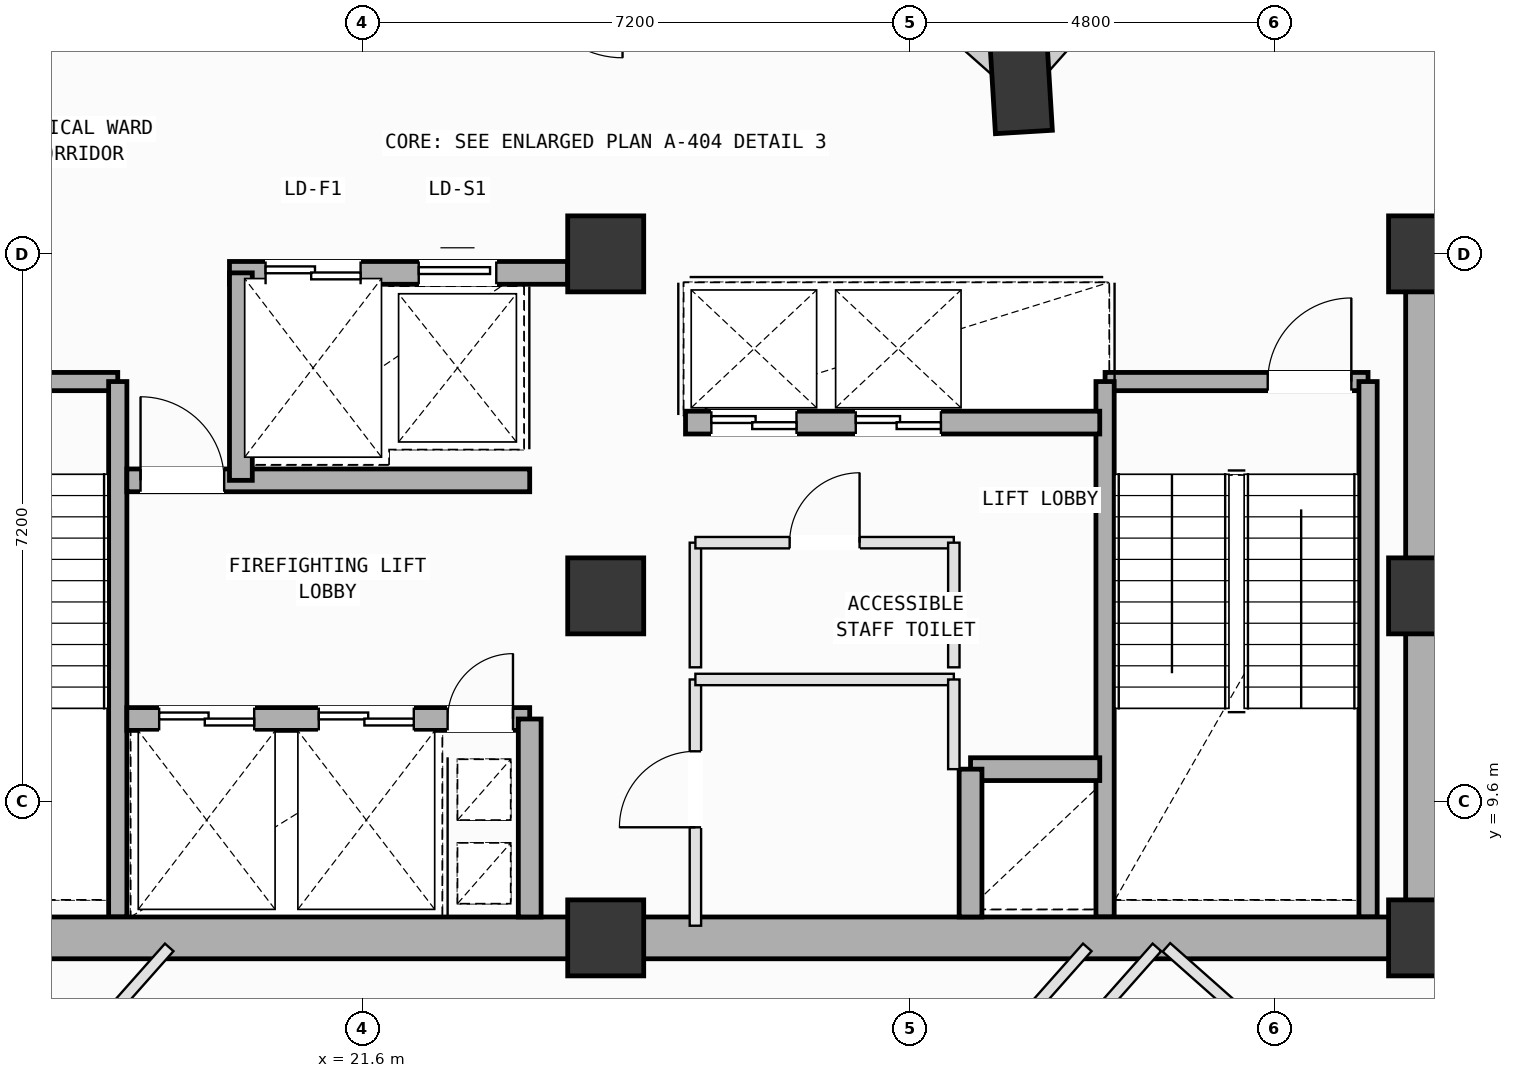
"""IFC4 building model, lengths in metres.
Left out: names, types, materials, properties, quantities, classifications, styles, units other than length and angle.
Written with IfcOpenShell. Run it as: python <this file> out.ifc"""

import sys

from ifc_helpers import new_model, si_unit, direction, frame, frame_2d, origin, origin_2d, place, context, subcontext, project, spatial, rectangle, extrude, element, fill, save


model = new_model("IFC4")
c1 = context("Model", 3, precision=1e-05, world=origin(), true_north=direction((0.0, 1.0)))
c2 = subcontext(c1, "Body", "Model", "MODEL_VIEW")
j1 = project(units=[si_unit("LENGTHUNIT", "METRE"), si_unit("PLANEANGLEUNIT", "RADIAN")], contexts=[c1])
p1 = place(None, origin())
s1 = spatial("IfcSite", under=j1, at=p1, CompositionType="ELEMENT")
p2 = place(p1, origin())
s2 = spatial("IfcBuilding", under=s1, at=p2, CompositionType="ELEMENT")
p3 = place(p2, frame((0.0, 0.0, 231.2)))
s3 = spatial("IfcBuildingStorey", under=s2, at=p3, CompositionType="ELEMENT", Elevation=231.2)
for number, where, z_axis, x_axis in (
    (1, (24.8, 7.8, 0.0), (0.0, 0.0, 1.0), (1.0, 0.0, 0.0)),
    (2, (24.8, 12.3, 0.0), (0.0, 0.0, 1.0), (1.0, 0.0, 0.0)),
    (3, (24.8, 16.8, 0.0), (0.0, 0.0, 1.0), (1.0, 0.0, 0.0)),
    (4, (35.6, 7.8, 0.0), (0.0, 0.0, 1.0), (1.0, 0.0, 0.0)),
    (5, (35.6, 12.3, 0.0), (0.0, 0.0, 1.0), (1.0, 0.0, 0.0)),
    (6, (35.6, 16.8, 0.0), (0.0, 0.0, 1.0), (1.0, 0.0, 0.0)),
):
    element("IfcColumn", number, at=place(p3, frame(where, z_axis=z_axis, x_axis=x_axis)), inside=s3, PredefinedType="COLUMN", context=c2, shape_type="SweptSolid", body=[
        extrude(rectangle(XDim=1.0, YDim=1.0, at=origin_2d()), origin(), (0.0, 0.0, 1.0), 4.0),
    ])
p4 = place(p3, frame((30.266, 19.003, 0.002), z_axis=(0.024121719548, -0.013618084707, 0.999616271584), x_axis=(-0.898481897541, 0.438138960704, 0.02765015198)))
e7 = element("IfcColumn", 7, at=p4, inside=s3, PredefinedType="COLUMN", context=c2, shape_type="SweptSolid", body=[
    extrude(rectangle(XDim=1.2, YDim=0.75, at=origin_2d()), origin(), (0.0, 0.0, 1.0), 3.998),
])
p5 = place(p3, frame((30.535, 19.306, 0.0), z_axis=(0.0, 0.0, 1.0), x_axis=(0.663265631708, 0.748384060356, 0.0)))
e8 = element("IfcWall", 8, at=p5, inside=s3, PredefinedType="SOLIDWALL", context=c2, shape_type="SweptSolid", body=[
    extrude(rectangle(XDim=6.158, YDim=0.28, at=frame_2d((3.079, 0.0))), origin(), (0.0, 0.0, 1.0), 3.265),
])
p6 = place(p5, frame((0.858, 0.0, 0.75)))
e9 = element("IfcOpeningElement", 9, at=p6, cuts=e8, PredefinedType="OPENING", context=c2, shape_type="SweptSolid", body=[
    extrude(rectangle(XDim=1.2, YDim=1.75, at=frame_2d((0.6, 0.875))), frame((0.0, 0.15, 0.0), z_axis=(0.0, -1.0, 0.0), x_axis=(1.0, 0.0, 0.0)), (0.0, 0.0, 1.0), 0.3),
])
p7 = place(p5, frame((4.406, 0.0, 0.75)))
e10 = element("IfcOpeningElement", 10, at=p7, cuts=e8, PredefinedType="OPENING", context=c2, shape_type="SweptSolid", body=[
    extrude(rectangle(XDim=1.2, YDim=1.75, at=frame_2d((0.6, 0.875))), frame((0.0, 0.15, 0.0), z_axis=(0.0, -1.0, 0.0), x_axis=(1.0, 0.0, 0.0)), (0.0, 0.0, 1.0), 0.3),
])
p8 = place(p3, frame((24.802, 23.845, 0.0), z_axis=(0.0, 0.0, 1.0), x_axis=(0.748368709558, -0.663282952106, 0.0)))
e11 = element("IfcWall", 11, at=p8, inside=s3, PredefinedType="SOLIDWALL", context=c2, shape_type="SweptSolid", body=[
    extrude(rectangle(XDim=6.958, YDim=0.28, at=frame_2d((3.479, 0.0))), origin(), (0.0, 0.0, 1.0), 3.165),
])
p9 = place(p3, frame((14.92, 15.12, 0.0), z_axis=(0.0, 0.0, 1.0), x_axis=(1.0, 0.0, 0.0)))
e12 = element("IfcWall", 12, at=p9, inside=s3, PredefinedType="SOLIDWALL", context=c2, shape_type="SweptSolid", body=[
    extrude(rectangle(XDim=3.46, YDim=0.24, at=frame_2d((1.73, 0.0))), origin(), (0.0, 0.0, 1.0), 3.78),
])
p10 = place(p9, frame((0.22, 0.0, 0.0)))
e13 = element("IfcOpeningElement", 13, at=p10, cuts=e12, PredefinedType="OPENING", context=c2, shape_type="SweptSolid", body=[
    extrude(rectangle(XDim=1.1, YDim=2.15, at=frame_2d((0.55, 1.075))), frame((0.0, 0.13, 0.0), z_axis=(0.0, -1.0, 0.0), x_axis=(1.0, 0.0, 0.0)), (0.0, 0.0, 1.0), 0.26),
])
p11 = place(p3, frame((18.38, 15.12, 0.0), z_axis=(0.0, 0.0, 1.0), x_axis=(0.0, -1.0, 0.0)))
e14 = element("IfcWall", 14, at=p11, inside=s3, PredefinedType="SOLIDWALL", context=c2, shape_type="SweptSolid", body=[
    extrude(rectangle(XDim=7.045, YDim=0.24, at=frame_2d((3.522, 0.0))), origin(), (0.0, 0.0, 1.0), 3.78),
])
p12 = place(p3, frame((31.37, 15.12, 0.0), z_axis=(0.0, 0.0, 1.0), x_axis=(1.0, 0.0, 0.0)))
e15 = element("IfcWall", 15, at=p12, inside=s3, PredefinedType="SOLIDWALL", context=c2, shape_type="SweptSolid", body=[
    extrude(rectangle(XDim=3.46, YDim=0.24, at=frame_2d((1.73, 0.0))), origin(), (0.0, 0.0, 1.0), 3.78),
])
p13 = place(p12, frame((2.14, 0.0, 0.0)))
e16 = element("IfcOpeningElement", 16, at=p13, cuts=e15, PredefinedType="OPENING", context=c2, shape_type="SweptSolid", body=[
    extrude(rectangle(XDim=1.1, YDim=2.15, at=frame_2d((0.55, 1.075))), frame((0.0, 0.13, 0.0), z_axis=(0.0, -1.0, 0.0), x_axis=(1.0, 0.0, 0.0)), (0.0, 0.0, 1.0), 0.26),
])
for number, where, z_axis, x_axis in (
    (17, (34.83, 15.12, 0.0), (0.0, 0.0, 1.0), (0.0, -1.0, 0.0)),
    (18, (31.37, 8.075, 0.0), (0.0, 0.0, 1.0), (0.0, 1.0, 0.0)),
):
    element("IfcWall", number, at=place(p3, frame(where, z_axis=z_axis, x_axis=x_axis)), inside=s3, PredefinedType="SOLIDWALL", context=c2, shape_type="SweptSolid", body=[
        extrude(rectangle(XDim=7.045, YDim=0.24, at=frame_2d((3.522, 0.0))), origin(), (0.0, 0.0, 1.0), 3.78),
    ])
for number, where, z_axis, x_axis in (
    (19, (14.0, 7.8, 0.0), (0.0, 0.0, 1.0), (1.0, 0.0, 0.0)),
    (20, (24.8, 7.8, 0.0), (0.0, 0.0, 1.0), (1.0, 0.0, 0.0)),
):
    element("IfcWall", number, at=place(p3, frame(where, z_axis=z_axis, x_axis=x_axis)), inside=s3, PredefinedType="SHEAR", context=c2, shape_type="SweptSolid", body=[
        extrude(rectangle(XDim=10.8, YDim=0.55, at=frame_2d((5.4, 0.0))), origin(), (0.0, 0.0, 1.0), 3.78),
    ])
p14 = place(p3, frame((35.6, 7.8, 0.0), z_axis=(0.0, 0.0, 1.0), x_axis=(0.0, 1.0, 0.0)))
e21 = element("IfcWall", 21, at=p14, inside=s3, PredefinedType="SHEAR", context=c2, shape_type="SweptSolid", body=[
    extrude(rectangle(XDim=9.0, YDim=0.55, at=frame_2d((4.5, 0.0))), origin(), (0.0, 0.0, 1.0), 3.78),
])
p15 = place(p3, frame((19.85, 16.55, 0.0), z_axis=(0.0, 0.0, 1.0), x_axis=(1.0, 0.0, 0.0)))
e22 = element("IfcWall", 22, at=p15, inside=s3, PredefinedType="SOLIDWALL", context=c2, shape_type="SweptSolid", body=[
    extrude(rectangle(XDim=4.45, YDim=0.3, at=frame_2d((2.225, 0.0))), origin(), (0.0, 0.0, 1.0), 3.78),
])
p16 = place(p15, frame((0.475, 0.0, 0.0)))
e23 = element("IfcOpeningElement", 23, at=p16, cuts=e22, PredefinedType="OPENING", context=c2, shape_type="SweptSolid", body=[
    extrude(rectangle(XDim=1.25, YDim=2.18, at=frame_2d((0.625, 1.09))), frame((0.0, 0.16, 0.0), z_axis=(0.0, -1.0, 0.0), x_axis=(1.0, 0.0, 0.0)), (0.0, 0.0, 1.0), 0.32),
])
p17 = place(p15, frame((2.49, 0.0, 0.0)))
e24 = element("IfcOpeningElement", 24, at=p17, cuts=e22, PredefinedType="OPENING", context=c2, shape_type="SweptSolid", body=[
    extrude(rectangle(XDim=1.02, YDim=2.12, at=frame_2d((0.51, 1.06))), frame((0.0, 0.16, 0.0), z_axis=(0.0, -1.0, 0.0), x_axis=(1.0, 0.0, 0.0)), (0.0, 0.0, 1.0), 0.32),
])
p18 = place(p3, frame((18.5, 10.68, 0.0), z_axis=(0.0, 0.0, 1.0), x_axis=(1.0, 0.0, 0.0)))
e25 = element("IfcWall", 25, at=p18, inside=s3, PredefinedType="SOLIDWALL", context=c2, shape_type="SweptSolid", body=[
    extrude(rectangle(XDim=5.3, YDim=0.3, at=frame_2d((2.65, 0.0))), origin(), (0.0, 0.0, 1.0), 3.78),
])
p19 = place(p18, frame((4.22, 0.0, 0.0)))
e26 = element("IfcOpeningElement", 26, at=p19, cuts=e25, PredefinedType="OPENING", context=c2, shape_type="SweptSolid", body=[
    extrude(rectangle(XDim=0.86, YDim=2.06, at=frame_2d((0.43, 1.03))), frame((0.0, 0.16, 0.0), z_axis=(0.0, -1.0, 0.0), x_axis=(1.0, 0.0, 0.0)), (0.0, 0.0, 1.0), 0.32),
])
p20 = place(p18, frame((0.425, 0.0, 0.0)))
e27 = element("IfcOpeningElement", 27, at=p20, cuts=e25, PredefinedType="OPENING", context=c2, shape_type="SweptSolid", body=[
    extrude(rectangle(XDim=1.25, YDim=2.18, at=frame_2d((0.625, 1.09))), frame((0.0, 0.16, 0.0), z_axis=(0.0, -1.0, 0.0), x_axis=(1.0, 0.0, 0.0)), (0.0, 0.0, 1.0), 0.32),
])
p21 = place(p18, frame((2.525, 0.0, 0.0)))
e28 = element("IfcOpeningElement", 28, at=p21, cuts=e25, PredefinedType="OPENING", context=c2, shape_type="SweptSolid", body=[
    extrude(rectangle(XDim=1.25, YDim=2.18, at=frame_2d((0.625, 1.09))), frame((0.0, 0.16, 0.0), z_axis=(0.0, -1.0, 0.0), x_axis=(1.0, 0.0, 0.0)), (0.0, 0.0, 1.0), 0.32),
])
p22 = place(p3, frame((18.5, 13.82, 0.0), z_axis=(0.0, 0.0, 1.0), x_axis=(1.0, 0.0, 0.0)))
e29 = element("IfcWall", 29, at=p22, inside=s3, PredefinedType="SOLIDWALL", context=c2, shape_type="SweptSolid", body=[
    extrude(rectangle(XDim=5.3, YDim=0.3, at=frame_2d((2.65, 0.0))), origin(), (0.0, 0.0, 1.0), 3.78),
])
p23 = place(p22, frame((0.18, 0.0, 0.0)))
e30 = element("IfcOpeningElement", 30, at=p23, cuts=e29, PredefinedType="OPENING", context=c2, shape_type="SweptSolid", body=[
    extrude(rectangle(XDim=1.1, YDim=2.15, at=frame_2d((0.55, 1.075))), frame((0.0, 0.16, 0.0), z_axis=(0.0, -1.0, 0.0), x_axis=(1.0, 0.0, 0.0)), (0.0, 0.0, 1.0), 0.32),
])
p24 = place(p3, frame((23.8, 8.075, 0.0), z_axis=(0.0, 0.0, 1.0), x_axis=(0.0, 1.0, 0.0)))
e31 = element("IfcWall", 31, at=p24, inside=s3, PredefinedType="SOLIDWALL", context=c2, shape_type="SweptSolid", body=[
    extrude(rectangle(XDim=2.605, YDim=0.3, at=frame_2d((1.302, 0.0))), origin(), (0.0, 0.0, 1.0), 3.78),
])
p25 = place(p3, frame((20.0, 13.82, 0.0), z_axis=(0.0, 0.0, 1.0), x_axis=(0.0, 1.0, 0.0)))
e32 = element("IfcWall", 32, at=p25, inside=s3, PredefinedType="SOLIDWALL", context=c2, shape_type="SweptSolid", body=[
    extrude(rectangle(XDim=2.73, YDim=0.3, at=frame_2d((1.365, 0.0))), origin(), (0.0, 0.0, 1.0), 3.78),
])
p26 = place(p3, frame((29.6, 10.02, 0.0), z_axis=(0.0, 0.0, 1.0), x_axis=(1.0, 0.0, 0.0)))
e33 = element("IfcWall", 33, at=p26, inside=s3, PredefinedType="SOLIDWALL", context=c2, shape_type="SweptSolid", body=[
    extrude(rectangle(XDim=1.7, YDim=0.3, at=frame_2d((0.85, 0.0))), origin(), (0.0, 0.0, 1.0), 3.78),
])
p27 = place(p3, frame((29.6, 8.075, 0.0), z_axis=(0.0, 0.0, 1.0), x_axis=(0.0, 1.0, 0.0)))
e34 = element("IfcWall", 34, at=p27, inside=s3, PredefinedType="SOLIDWALL", context=c2, shape_type="SweptSolid", body=[
    extrude(rectangle(XDim=1.945, YDim=0.3, at=frame_2d((0.973, 0.0))), origin(), (0.0, 0.0, 1.0), 3.78),
])
p28 = place(p3, frame((25.85, 14.58, 0.0), z_axis=(0.0, 0.0, 1.0), x_axis=(1.0, 0.0, 0.0)))
e35 = element("IfcWall", 35, at=p28, inside=s3, PredefinedType="SOLIDWALL", context=c2, shape_type="SweptSolid", body=[
    extrude(rectangle(XDim=5.45, YDim=0.3, at=frame_2d((2.725, 0.0))), origin(), (0.0, 0.0, 1.0), 3.78),
])
p29 = place(p28, frame((0.34, 0.0, 0.0)))
e36 = element("IfcOpeningElement", 36, at=p29, cuts=e35, PredefinedType="OPENING", context=c2, shape_type="SweptSolid", body=[
    extrude(rectangle(XDim=1.12, YDim=2.15, at=frame_2d((0.56, 1.075))), frame((0.0, 0.16, 0.0), z_axis=(0.0, -1.0, 0.0), x_axis=(1.0, 0.0, 0.0)), (0.0, 0.0, 1.0), 0.32),
])
p30 = place(p28, frame((2.24, 0.0, 0.0)))
e37 = element("IfcOpeningElement", 37, at=p30, cuts=e35, PredefinedType="OPENING", context=c2, shape_type="SweptSolid", body=[
    extrude(rectangle(XDim=1.12, YDim=2.15, at=frame_2d((0.56, 1.075))), frame((0.0, 0.16, 0.0), z_axis=(0.0, -1.0, 0.0), x_axis=(1.0, 0.0, 0.0)), (0.0, 0.0, 1.0), 0.32),
])
p31 = place(p3, frame((25.98, 7.96, 0.0), z_axis=(0.0, 0.0, 1.0), x_axis=(0.0, 1.0, 0.0)))
e38 = element("IfcWall", 38, at=p31, inside=s3, PredefinedType="PARTITIONING", context=c2, shape_type="SweptSolid", body=[
    extrude(rectangle(XDim=3.24, YDim=0.15, at=frame_2d((1.62, 0.0))), origin(), (0.0, 0.0, 1.0), 3.78),
])
p32 = place(p31, frame((1.295, 0.0, 0.0)))
e39 = element("IfcOpeningElement", 39, at=p32, cuts=e38, PredefinedType="OPENING", context=c2, shape_type="SweptSolid", body=[
    extrude(rectangle(XDim=1.0, YDim=2.12, at=frame_2d((0.5, 1.06))), frame((0.0, 0.085, 0.0), z_axis=(0.0, -1.0, 0.0), x_axis=(1.0, 0.0, 0.0)), (0.0, 0.0, 1.0), 0.17),
])
p33 = place(p3, frame((25.98, 11.2, 0.0), z_axis=(0.0, 0.0, 1.0), x_axis=(1.0, 0.0, 0.0)))
e40 = element("IfcWall", 40, at=p33, inside=s3, PredefinedType="PARTITIONING", context=c2, shape_type="SweptSolid", body=[
    extrude(rectangle(XDim=3.4, YDim=0.15, at=frame_2d((1.7, 0.0))), origin(), (0.0, 0.0, 1.0), 3.78),
])
p34 = place(p3, frame((29.38, 11.2, 0.0), z_axis=(0.0, 0.0, 1.0), x_axis=(0.0, -1.0, 0.0)))
e41 = element("IfcWall", 41, at=p34, inside=s3, PredefinedType="PARTITIONING", context=c2, shape_type="SweptSolid", body=[
    extrude(rectangle(XDim=1.18, YDim=0.15, at=frame_2d((0.59, 0.0))), origin(), (0.0, 0.0, 1.0), 3.78),
])
p35 = place(p3, frame((25.98, 11.36, 0.0), z_axis=(0.0, 0.0, 1.0), x_axis=(0.0, 1.0, 0.0)))
e42 = element("IfcWall", 42, at=p35, inside=s3, PredefinedType="PARTITIONING", context=c2, shape_type="SweptSolid", body=[
    extrude(rectangle(XDim=1.64, YDim=0.15, at=frame_2d((0.82, 0.0))), origin(), (0.0, 0.0, 1.0), 3.78),
])
p36 = place(p3, frame((25.98, 13.0, 0.0), z_axis=(0.0, 0.0, 1.0), x_axis=(1.0, 0.0, 0.0)))
e43 = element("IfcWall", 43, at=p36, inside=s3, PredefinedType="PARTITIONING", context=c2, shape_type="SweptSolid", body=[
    extrude(rectangle(XDim=3.4, YDim=0.15, at=frame_2d((1.7, 0.0))), origin(), (0.0, 0.0, 1.0), 3.78),
])
p37 = place(p36, frame((1.24, 0.0, 0.0)))
e44 = element("IfcOpeningElement", 44, at=p37, cuts=e43, PredefinedType="OPENING", context=c2, shape_type="SweptSolid", body=[
    extrude(rectangle(XDim=0.92, YDim=2.1, at=frame_2d((0.46, 1.05))), frame((0.0, 0.085, 0.0), z_axis=(0.0, -1.0, 0.0), x_axis=(1.0, 0.0, 0.0)), (0.0, 0.0, 1.0), 0.17),
])
p38 = place(p3, frame((29.38, 13.0, 0.0), z_axis=(0.0, 0.0, 1.0), x_axis=(0.0, -1.0, 0.0)))
e45 = element("IfcWall", 45, at=p38, inside=s3, PredefinedType="PARTITIONING", context=c2, shape_type="SweptSolid", body=[
    extrude(rectangle(XDim=1.64, YDim=0.15, at=frame_2d((0.82, 0.0))), origin(), (0.0, 0.0, 1.0), 3.78),
])
p39 = place(p3, frame((28.499, 3.666, 0.0), z_axis=(0.0, 0.0, 1.0), x_axis=(0.663257046458, 0.748391669064, 0.0)))
e46 = element("IfcWall", 46, at=p39, inside=s3, PredefinedType="PARTITIONING", context=c2, shape_type="SweptSolid", body=[
    extrude(rectangle(XDim=5.357, YDim=0.15, at=frame_2d((2.678, 0.0))), origin(), (0.0, 0.0, 1.0), 3.78),
])
p40 = place(p3, frame((32.177, 7.675, 0.0), z_axis=(0.0, 0.0, 1.0), x_axis=(0.748389037184, -0.66326001615, 0.0)))
e47 = element("IfcWall", 47, at=p40, inside=s3, PredefinedType="PARTITIONING", context=c2, shape_type="SweptSolid", body=[
    extrude(rectangle(XDim=11.842, YDim=0.15, at=frame_2d((5.921, 0.0))), origin(), (0.0, 0.0, 1.0), 3.78),
])
p41 = place(p40, frame((5.731, 0.0, 0.0)))
e48 = element("IfcOpeningElement", 48, at=p41, cuts=e47, PredefinedType="OPENING", context=c2, shape_type="SweptSolid", body=[
    extrude(rectangle(XDim=0.86, YDim=2.06, at=frame_2d((0.43, 1.03))), frame((0.0, 0.085, 0.0), z_axis=(0.0, -1.0, 0.0), x_axis=(1.0, 0.0, 0.0)), (0.0, 0.0, 1.0), 0.17),
])
p42 = place(p3, frame((35.6, 7.5, 0.0), z_axis=(0.0, 0.0, 1.0), x_axis=(1.0, 0.0, 0.0)))
e49 = element("IfcWall", 49, at=p42, inside=s3, PredefinedType="PARTITIONING", context=c2, shape_type="SweptSolid", body=[
    extrude(rectangle(XDim=0.55, YDim=0.15, at=frame_2d((0.275, 0.0))), origin(), (0.0, 0.0, 1.0), 3.78),
])
p43 = place(p3, frame((15.825, 4.028, 0.0), z_axis=(0.0, 0.0, 1.0), x_axis=(0.663237367069, 0.748409109327, 0.0)))
e50 = element("IfcWall", 50, at=p43, inside=s3, PredefinedType="PARTITIONING", context=c2, shape_type="SweptSolid", body=[
    extrude(rectangle(XDim=4.873, YDim=0.15, at=frame_2d((2.437, 0.0))), origin(), (0.0, 0.0, 1.0), 3.78),
])
p44 = place(p43, frame((1.89, 0.0, 0.0)))
e51 = element("IfcOpeningElement", 51, at=p44, cuts=e50, PredefinedType="OPENING", context=c2, shape_type="SweptSolid", body=[
    extrude(rectangle(XDim=0.86, YDim=2.06, at=frame_2d((0.43, 1.03))), frame((0.0, 0.085, 0.0), z_axis=(0.0, -1.0, 0.0), x_axis=(1.0, 0.0, 0.0)), (0.0, 0.0, 1.0), 0.17),
])
p45 = place(p3, frame((31.136, 7.675, 0.0), z_axis=(0.0, 0.0, 1.0), x_axis=(-0.663248185995, -0.748399521495, 0.0)))
e52 = element("IfcWall", 52, at=p45, inside=s3, PredefinedType="PARTITIONING", context=c2, shape_type="SweptSolid", body=[
    extrude(rectangle(XDim=12.885, YDim=0.15, at=frame_2d((6.442, 0.0))), origin(), (0.0, 0.0, 1.0), 3.78),
])
p46 = place(p13, origin())
e53 = element("IfcDoor", 53, at=p46, inside=s3, OperationType="SINGLE_SWING_RIGHT", PredefinedType="DOOR", context=c2, shape_type="SweptSolid", body=[
    extrude(rectangle(XDim=1.1, YDim=2.15, at=frame_2d((0.55, 1.075))), frame((0.0, 0.025, 0.0), z_axis=(0.0, -1.0, 0.0), x_axis=(1.0, 0.0, 0.0)), (0.0, 0.0, 1.0), 0.05),
])
fill(e16, e53)
p47 = place(p19, origin())
e54 = element("IfcDoor", 54, at=p47, inside=s3, OperationType="SINGLE_SWING_RIGHT", PredefinedType="DOOR", context=c2, shape_type="SweptSolid", body=[
    extrude(rectangle(XDim=0.86, YDim=2.06, at=frame_2d((0.43, 1.03))), frame((0.0, 0.025, 0.0), z_axis=(0.0, -1.0, 0.0), x_axis=(1.0, 0.0, 0.0)), (0.0, 0.0, 1.0), 0.05),
])
fill(e26, e54)
p48 = place(p23, origin())
e55 = element("IfcDoor", 55, at=p48, inside=s3, OperationType="SINGLE_SWING_LEFT", PredefinedType="DOOR", context=c2, shape_type="SweptSolid", body=[
    extrude(rectangle(XDim=1.1, YDim=2.15, at=frame_2d((0.55, 1.075))), frame((0.0, 0.025, 0.0), z_axis=(0.0, -1.0, 0.0), x_axis=(1.0, 0.0, 0.0)), (0.0, 0.0, 1.0), 0.05),
])
fill(e30, e55)
p49 = place(p20, origin())
e56 = element("IfcDoor", 56, at=p49, inside=s3, OperationType="DOUBLE_DOOR_SLIDING", PredefinedType="DOOR", context=c2, shape_type="SweptSolid", body=[
    extrude(rectangle(XDim=1.25, YDim=2.18, at=frame_2d((0.625, 1.09))), frame((0.0, 0.025, 0.0), z_axis=(0.0, -1.0, 0.0), x_axis=(1.0, 0.0, 0.0)), (0.0, 0.0, 1.0), 0.05),
])
fill(e27, e56)
p50 = place(p21, origin())
e57 = element("IfcDoor", 57, at=p50, inside=s3, OperationType="DOUBLE_DOOR_SLIDING", PredefinedType="DOOR", context=c2, shape_type="SweptSolid", body=[
    extrude(rectangle(XDim=1.25, YDim=2.18, at=frame_2d((0.625, 1.09))), frame((0.0, 0.025, 0.0), z_axis=(0.0, -1.0, 0.0), x_axis=(1.0, 0.0, 0.0)), (0.0, 0.0, 1.0), 0.05),
])
fill(e28, e57)
p51 = place(p29, origin())
e58 = element("IfcDoor", 58, at=p51, inside=s3, OperationType="DOUBLE_DOOR_SLIDING", PredefinedType="DOOR", context=c2, shape_type="SweptSolid", body=[
    extrude(rectangle(XDim=1.12, YDim=2.15, at=frame_2d((0.56, 1.075))), frame((0.0, 0.025, 0.0), z_axis=(0.0, -1.0, 0.0), x_axis=(1.0, 0.0, 0.0)), (0.0, 0.0, 1.0), 0.05),
])
fill(e36, e58)
p52 = place(p30, origin())
e59 = element("IfcDoor", 59, at=p52, inside=s3, OperationType="DOUBLE_DOOR_SLIDING", PredefinedType="DOOR", context=c2, shape_type="SweptSolid", body=[
    extrude(rectangle(XDim=1.12, YDim=2.15, at=frame_2d((0.56, 1.075))), frame((0.0, 0.025, 0.0), z_axis=(0.0, -1.0, 0.0), x_axis=(1.0, 0.0, 0.0)), (0.0, 0.0, 1.0), 0.05),
])
fill(e37, e59)
p53 = place(p16, origin())
e60 = element("IfcDoor", 60, at=p53, inside=s3, OperationType="DOUBLE_DOOR_SLIDING", PredefinedType="DOOR", context=c2, shape_type="SweptSolid", body=[
    extrude(rectangle(XDim=1.25, YDim=2.18, at=frame_2d((0.625, 1.09))), frame((0.0, 0.025, 0.0), z_axis=(0.0, -1.0, 0.0), x_axis=(1.0, 0.0, 0.0)), (0.0, 0.0, 1.0), 0.05),
])
fill(e23, e60)
p54 = place(p17, origin())
e61 = element("IfcDoor", 61, at=p54, inside=s3, OperationType="SLIDING_TO_LEFT", PredefinedType="DOOR", context=c2, shape_type="SweptSolid", body=[
    extrude(rectangle(XDim=1.02, YDim=2.12, at=frame_2d((0.51, 1.06))), frame((0.0, 0.025, 0.0), z_axis=(0.0, -1.0, 0.0), x_axis=(1.0, 0.0, 0.0)), (0.0, 0.0, 1.0), 0.05),
])
fill(e24, e61)
p55 = place(p32, origin())
e62 = element("IfcDoor", 62, at=p55, inside=s3, OperationType="SINGLE_SWING_LEFT", PredefinedType="DOOR", context=c2, shape_type="SweptSolid", body=[
    extrude(rectangle(XDim=1.0, YDim=2.12, at=frame_2d((0.5, 1.06))), frame((0.0, 0.025, 0.0), z_axis=(0.0, -1.0, 0.0), x_axis=(1.0, 0.0, 0.0)), (0.0, 0.0, 1.0), 0.05),
])
fill(e39, e62)
p56 = place(p37, origin())
e63 = element("IfcDoor", 63, at=p56, inside=s3, OperationType="SINGLE_SWING_RIGHT", PredefinedType="DOOR", context=c2, shape_type="SweptSolid", body=[
    extrude(rectangle(XDim=0.92, YDim=2.1, at=frame_2d((0.46, 1.05))), frame((0.0, 0.025, 0.0), z_axis=(0.0, -1.0, 0.0), x_axis=(1.0, 0.0, 0.0)), (0.0, 0.0, 1.0), 0.05),
])
fill(e44, e63)
save(model, sys.argv[1])
